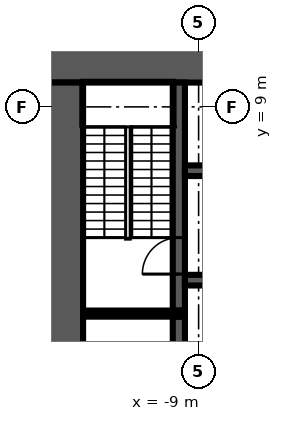
"""IFC4 building model, lengths in metres.
Left out: names, types, materials, properties, quantities, classifications, styles, units other than length and angle.
Written with IfcOpenShell. Run it as: python <this file> out.ifc"""

import sys

from ifc_helpers import new_model, si_unit, direction, frame, frame_2d, origin, place, context, subcontext, project, spatial, rectangle, extrude, element, fill, save


model = new_model("IFC4")
c1 = context("Model", 3, precision=1e-05, world=origin(), true_north=direction((0.0, 1.0)))
c2 = subcontext(c1, "Body", "Model", "MODEL_VIEW")
j1 = project(units=[si_unit("LENGTHUNIT", "METRE"), si_unit("PLANEANGLEUNIT", "RADIAN")], contexts=[c1])
p1 = place(None, origin())
s1 = spatial("IfcSite", under=j1, at=p1, CompositionType="ELEMENT")
p2 = place(p1, origin())
s2 = spatial("IfcBuilding", under=s1, at=p2, CompositionType="ELEMENT")
p3 = place(p2, frame((0.0, 0.0, 33.0)))
s3 = spatial("IfcBuildingStorey", under=s2, at=p3, CompositionType="ELEMENT", Elevation=33.0)
p4 = place(p3, frame((-14.0, 10.4, 0.0), z_axis=(0.0, 0.0, 1.0), x_axis=(1.0, 0.0, 0.0)))
e1 = element("IfcWall", 1, at=p4, inside=s3, PredefinedType="SHEAR", context=c2, shape_type="SweptSolid", body=[
    extrude(rectangle(XDim=28.0, YDim=1.2, at=frame_2d((14.0, 0.0))), origin(), (0.0, 0.0, 1.0), 4.6),
])
p5 = place(p4, frame((15.9, 0.0, 0.0)))
e2 = element("IfcOpeningElement", 2, at=p5, cuts=e1, PredefinedType="OPENING", context=c2, shape_type="SweptSolid", body=[
    extrude(rectangle(XDim=1.6, YDim=2.1, at=frame_2d((0.8, 1.05))), frame((0.0, 0.61, 0.0), z_axis=(0.0, -1.0, 0.0), x_axis=(1.0, 0.0, 0.0)), (0.0, 0.0, 1.0), 1.22),
])
p6 = place(p3, frame((-13.4, -9.8, 0.0), z_axis=(0.0, 0.0, 1.0), x_axis=(0.0, 1.0, 0.0)))
e3 = element("IfcWall", 3, at=p6, inside=s3, PredefinedType="SHEAR", context=c2, shape_type="SweptSolid", body=[
    extrude(rectangle(XDim=19.6, YDim=1.2, at=frame_2d((9.8, 0.0))), origin(), (0.0, 0.0, 1.0), 4.6),
])
p7 = place(p3, frame((-9.65, -2.1, 0.0), z_axis=(0.0, 0.0, 1.0), x_axis=(0.0, 1.0, 0.0)))
e4 = element("IfcWall", 4, at=p7, inside=s3, PredefinedType="SHEAR", context=c2, shape_type="SweptSolid", body=[
    extrude(rectangle(XDim=4.2, YDim=0.4, at=frame_2d((2.1, 0.0))), origin(), (0.0, 0.0, 1.0), 4.6),
])
p8 = place(p3, frame((-9.65, 2.3, 0.0), z_axis=(0.0, 0.0, 1.0), x_axis=(0.0, 1.0, 0.0)))
e5 = element("IfcWall", 5, at=p8, inside=s3, PredefinedType="SHEAR", context=c2, shape_type="SweptSolid", body=[
    extrude(rectangle(XDim=7.5, YDim=0.4, at=frame_2d((3.75, 0.0))), origin(), (0.0, 0.0, 1.0), 4.6),
])
p9 = place(p8, frame((1.2, 0.0, 0.0)))
e6 = element("IfcOpeningElement", 6, at=p9, cuts=e5, PredefinedType="OPENING", context=c2, shape_type="SweptSolid", body=[
    extrude(rectangle(XDim=1.2, YDim=2.1, at=frame_2d((0.6, 1.05))), frame((0.0, 0.21, 0.0), z_axis=(0.0, -1.0, 0.0), x_axis=(1.0, 0.0, 0.0)), (0.0, 0.0, 1.0), 0.42),
])
p10 = place(p3, frame((-9.45, 2.2, 0.0), z_axis=(0.0, 0.0, 1.0), x_axis=(-1.0, 0.0, 0.0)))
e7 = element("IfcWall", 7, at=p10, inside=s3, PredefinedType="SHEAR", context=c2, shape_type="SweptSolid", body=[
    extrude(rectangle(XDim=3.35, YDim=0.2, at=frame_2d((1.675, 0.0))), origin(), (0.0, 0.0, 1.0), 4.6),
])
p11 = place(p3, frame((-9.45, 6.9, 0.0), z_axis=(0.0, 0.0, 1.0), x_axis=(1.0, 0.0, 0.0)))
e8 = element("IfcWall", 8, at=p11, inside=s3, PredefinedType="SHEAR", context=c2, shape_type="SweptSolid", body=[
    extrude(rectangle(XDim=18.9, YDim=0.35, at=frame_2d((9.45, 0.0))), origin(), (0.0, 0.0, 1.0), 4.6),
])
p12 = place(p11, frame((0.8, 0.0, 0.0)))
e9 = element("IfcOpeningElement", 9, at=p12, cuts=e8, PredefinedType="OPENING", context=c2, shape_type="SweptSolid", body=[
    extrude(rectangle(XDim=1.1, YDim=2.1, at=frame_2d((0.55, 1.05))), frame((0.0, 0.185, 0.0), z_axis=(0.0, -1.0, 0.0), x_axis=(1.0, 0.0, 0.0)), (0.0, 0.0, 1.0), 0.37),
])
p13 = place(p11, frame((3.5, 0.0, 0.0)))
e10 = element("IfcOpeningElement", 10, at=p13, cuts=e8, PredefinedType="OPENING", context=c2, shape_type="SweptSolid", body=[
    extrude(rectangle(XDim=1.1, YDim=2.1, at=frame_2d((0.55, 1.05))), frame((0.0, 0.185, 0.0), z_axis=(0.0, -1.0, 0.0), x_axis=(1.0, 0.0, 0.0)), (0.0, 0.0, 1.0), 0.37),
])
p14 = place(p11, frame((6.2, 0.0, 0.0)))
e11 = element("IfcOpeningElement", 11, at=p14, cuts=e8, PredefinedType="OPENING", context=c2, shape_type="SweptSolid", body=[
    extrude(rectangle(XDim=1.1, YDim=2.1, at=frame_2d((0.55, 1.05))), frame((0.0, 0.185, 0.0), z_axis=(0.0, -1.0, 0.0), x_axis=(1.0, 0.0, 0.0)), (0.0, 0.0, 1.0), 0.37),
])
p15 = place(p11, frame((8.9, 0.0, 0.0)))
e12 = element("IfcOpeningElement", 12, at=p15, cuts=e8, PredefinedType="OPENING", context=c2, shape_type="SweptSolid", body=[
    extrude(rectangle(XDim=1.1, YDim=2.1, at=frame_2d((0.55, 1.05))), frame((0.0, 0.185, 0.0), z_axis=(0.0, -1.0, 0.0), x_axis=(1.0, 0.0, 0.0)), (0.0, 0.0, 1.0), 0.37),
])
p16 = place(p11, frame((11.55, 0.0, 0.0)))
e13 = element("IfcOpeningElement", 13, at=p16, cuts=e8, PredefinedType="OPENING", context=c2, shape_type="SweptSolid", body=[
    extrude(rectangle(XDim=1.2, YDim=2.1, at=frame_2d((0.6, 1.05))), frame((0.0, 0.185, 0.0), z_axis=(0.0, -1.0, 0.0), x_axis=(1.0, 0.0, 0.0)), (0.0, 0.0, 1.0), 0.37),
])
p17 = place(p11, frame((14.3, 0.0, 0.0)))
e14 = element("IfcOpeningElement", 14, at=p17, cuts=e8, PredefinedType="OPENING", context=c2, shape_type="SweptSolid", body=[
    extrude(rectangle(XDim=1.1, YDim=2.1, at=frame_2d((0.55, 1.05))), frame((0.0, 0.185, 0.0), z_axis=(0.0, -1.0, 0.0), x_axis=(1.0, 0.0, 0.0)), (0.0, 0.0, 1.0), 0.37),
])
p18 = place(p11, frame((17.0, 0.0, 0.0)))
e15 = element("IfcOpeningElement", 15, at=p18, cuts=e8, PredefinedType="OPENING", context=c2, shape_type="SweptSolid", body=[
    extrude(rectangle(XDim=1.1, YDim=2.1, at=frame_2d((0.55, 1.05))), frame((0.0, 0.185, 0.0), z_axis=(0.0, -1.0, 0.0), x_axis=(1.0, 0.0, 0.0)), (0.0, 0.0, 1.0), 0.37),
])
p19 = place(p3, frame((9.45, 3.3, 0.0), z_axis=(0.0, 0.0, 1.0), x_axis=(-1.0, 0.0, 0.0)))
e16 = element("IfcWall", 16, at=p19, inside=s3, PredefinedType="SHEAR", context=c2, shape_type="SweptSolid", body=[
    extrude(rectangle(XDim=18.9, YDim=0.35, at=frame_2d((9.45, 0.0))), origin(), (0.0, 0.0, 1.0), 4.6),
])
p20 = place(p19, frame((17.0, 0.0, 0.0)))
e17 = element("IfcOpeningElement", 17, at=p20, cuts=e16, PredefinedType="OPENING", context=c2, shape_type="SweptSolid", body=[
    extrude(rectangle(XDim=1.1, YDim=2.1, at=frame_2d((0.55, 1.05))), frame((0.0, 0.185, 0.0), z_axis=(0.0, -1.0, 0.0), x_axis=(1.0, 0.0, 0.0)), (0.0, 0.0, 1.0), 0.37),
])
p21 = place(p19, frame((14.3, 0.0, 0.0)))
e18 = element("IfcOpeningElement", 18, at=p21, cuts=e16, PredefinedType="OPENING", context=c2, shape_type="SweptSolid", body=[
    extrude(rectangle(XDim=1.1, YDim=2.1, at=frame_2d((0.55, 1.05))), frame((0.0, 0.185, 0.0), z_axis=(0.0, -1.0, 0.0), x_axis=(1.0, 0.0, 0.0)), (0.0, 0.0, 1.0), 0.37),
])
p22 = place(p19, frame((11.6, 0.0, 0.0)))
e19 = element("IfcOpeningElement", 19, at=p22, cuts=e16, PredefinedType="OPENING", context=c2, shape_type="SweptSolid", body=[
    extrude(rectangle(XDim=1.1, YDim=2.1, at=frame_2d((0.55, 1.05))), frame((0.0, 0.185, 0.0), z_axis=(0.0, -1.0, 0.0), x_axis=(1.0, 0.0, 0.0)), (0.0, 0.0, 1.0), 0.37),
])
p23 = place(p19, frame((8.9, 0.0, 0.0)))
e20 = element("IfcOpeningElement", 20, at=p23, cuts=e16, PredefinedType="OPENING", context=c2, shape_type="SweptSolid", body=[
    extrude(rectangle(XDim=1.1, YDim=2.1, at=frame_2d((0.55, 1.05))), frame((0.0, 0.185, 0.0), z_axis=(0.0, -1.0, 0.0), x_axis=(1.0, 0.0, 0.0)), (0.0, 0.0, 1.0), 0.37),
])
p24 = place(p19, frame((6.2, 0.0, 0.0)))
e21 = element("IfcOpeningElement", 21, at=p24, cuts=e16, PredefinedType="OPENING", context=c2, shape_type="SweptSolid", body=[
    extrude(rectangle(XDim=1.1, YDim=2.1, at=frame_2d((0.55, 1.05))), frame((0.0, 0.185, 0.0), z_axis=(0.0, -1.0, 0.0), x_axis=(1.0, 0.0, 0.0)), (0.0, 0.0, 1.0), 0.37),
])
p25 = place(p19, frame((3.5, 0.0, 0.0)))
e22 = element("IfcOpeningElement", 22, at=p25, cuts=e16, PredefinedType="OPENING", context=c2, shape_type="SweptSolid", body=[
    extrude(rectangle(XDim=1.1, YDim=2.1, at=frame_2d((0.55, 1.05))), frame((0.0, 0.185, 0.0), z_axis=(0.0, -1.0, 0.0), x_axis=(1.0, 0.0, 0.0)), (0.0, 0.0, 1.0), 0.37),
])
p26 = place(p19, frame((0.9, 0.0, 0.0)))
e23 = element("IfcOpeningElement", 23, at=p26, cuts=e16, PredefinedType="OPENING", context=c2, shape_type="SweptSolid", body=[
    extrude(rectangle(XDim=0.9, YDim=2.1, at=frame_2d((0.45, 1.05))), frame((0.0, 0.185, 0.0), z_axis=(0.0, -1.0, 0.0), x_axis=(1.0, 0.0, 0.0)), (0.0, 0.0, 1.0), 0.37),
])
p27 = place(p9, origin())
e24 = element("IfcDoor", 24, at=p27, inside=s3, OperationType="SINGLE_SWING_RIGHT", PredefinedType="DOOR", context=c2, shape_type="SweptSolid", body=[
    extrude(rectangle(XDim=1.2, YDim=2.1, at=frame_2d((0.6, 1.05))), frame((0.0, 0.025, 0.0), z_axis=(0.0, -1.0, 0.0), x_axis=(1.0, 0.0, 0.0)), (0.0, 0.0, 1.0), 0.05),
])
fill(e6, e24)
save(model, sys.argv[1])
